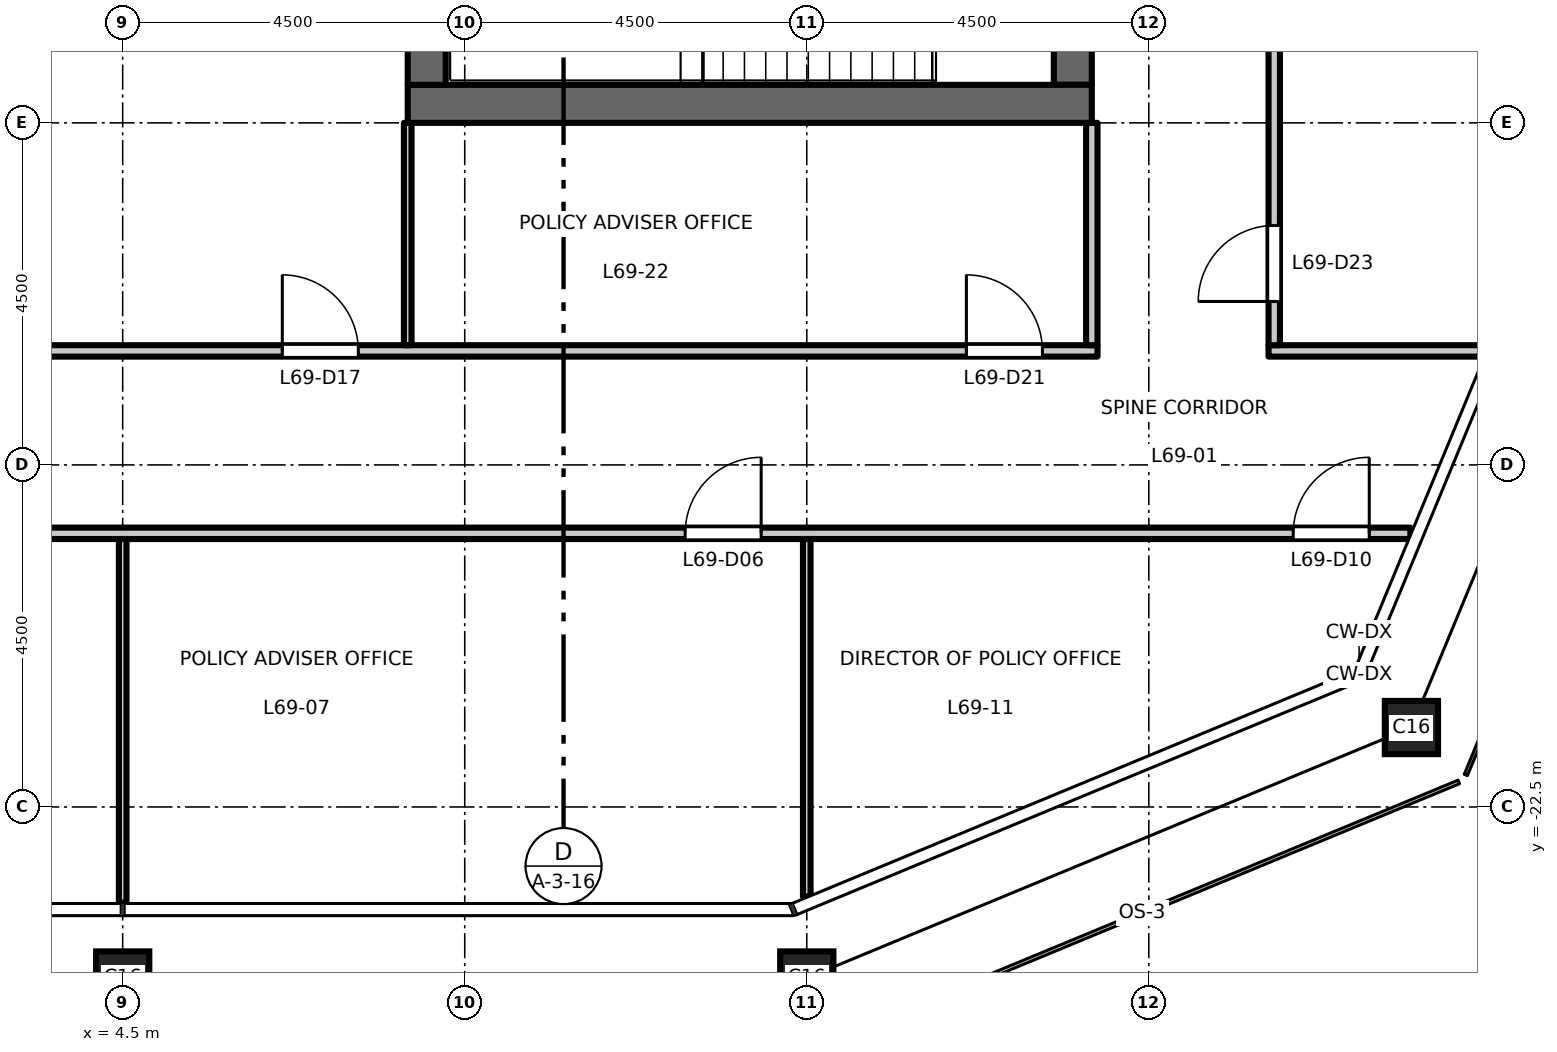
"""IFC4 building model, lengths in metres.
Left out: names, types, materials, properties, quantities, classifications, styles, units other than length and angle.
Written with IfcOpenShell. Run it as: python <this file> out.ifc"""

import sys

from ifc_helpers import new_model, si_unit, direction, frame, frame_2d, origin, origin_2d, place, context, subcontext, project, spatial, rectangle, hollow_rectangle, extrude, element, fill, save


model = new_model("IFC4")
c1 = context("Model", 3, precision=1e-05, world=origin(), true_north=direction((0.0, 1.0)))
c2 = subcontext(c1, "Body", "Model", "MODEL_VIEW")
j1 = project(units=[si_unit("LENGTHUNIT", "METRE"), si_unit("PLANEANGLEUNIT", "RADIAN")], contexts=[c1])
p1 = place(None, origin())
s1 = spatial("IfcSite", under=j1, at=p1, CompositionType="ELEMENT")
p2 = place(p1, origin())
s2 = spatial("IfcBuilding", under=s1, at=p2, CompositionType="ELEMENT")
p3 = place(p2, frame((0.0, 0.0, 321.2)))
s3 = spatial("IfcBuildingStorey", under=s2, at=p3, CompositionType="ELEMENT", Elevation=321.2)
for number, where, z_axis, x_axis in (
    (1, (4.5, -24.75, 0.0), (0.0, 0.0, 1.0), (1.0, 0.0, 0.0)),
    (2, (13.5, -24.75, 0.0), (0.0, 0.0, 1.0), (1.0, 0.0, 0.0)),
    (3, (21.455, -21.455, 0.0), (0.0, 0.0, 1.0), (1.0, 0.0, 0.0)),
):
    element("IfcColumn", number, at=place(p3, frame(where, z_axis=z_axis, x_axis=x_axis)), inside=s3, PredefinedType="COLUMN", context=c2, shape_type="SweptSolid", body=[
        extrude(hollow_rectangle(XDim=0.7, YDim=0.7, WallThickness=0.036, at=origin_2d()), origin(), (0.0, 0.0, 1.0), 4.5),
    ])
p4 = place(p3, frame((17.0, -13.0, 0.0), z_axis=(0.0, 0.0, 1.0), x_axis=(0.0, 1.0, 0.0)))
e4 = element("IfcWall", 4, at=p4, inside=s3, PredefinedType="SHEAR", context=c2, shape_type="SweptSolid", body=[
    extrude(rectangle(XDim=26.0, YDim=0.5, at=frame_2d((13.0, 0.0))), origin(), (0.0, 0.0, 1.0), 4.35),
])
p5 = place(p4, frame((16.825, 0.0, 0.0)))
e5 = element("IfcOpeningElement", 5, at=p5, cuts=e4, PredefinedType="OPENING", context=c2, shape_type="SweptSolid", body=[
    extrude(rectangle(XDim=1.8, YDim=2.1, at=frame_2d((0.9, 1.05))), frame((0.0, 0.26, 0.0), z_axis=(0.0, -1.0, 0.0), x_axis=(1.0, 0.0, 0.0)), (0.0, 0.0, 1.0), 0.52),
])
p6 = place(p4, frame((7.375, 0.0, 0.0)))
e6 = element("IfcOpeningElement", 6, at=p6, cuts=e4, PredefinedType="OPENING", context=c2, shape_type="SweptSolid", body=[
    extrude(rectangle(XDim=1.8, YDim=2.1, at=frame_2d((0.9, 1.05))), frame((0.0, 0.26, 0.0), z_axis=(0.0, -1.0, 0.0), x_axis=(1.0, 0.0, 0.0)), (0.0, 0.0, 1.0), 0.52),
])
p7 = place(p3, frame((8.25, -13.25, 0.0), z_axis=(0.0, 0.0, 1.0), x_axis=(1.0, 0.0, 0.0)))
e7 = element("IfcWall", 7, at=p7, inside=s3, PredefinedType="SHEAR", context=c2, shape_type="SweptSolid", body=[
    extrude(rectangle(XDim=9.0, YDim=0.5, at=frame_2d((4.5, 0.0))), origin(), (0.0, 0.0, 1.0), 4.35),
])
p8 = place(p3, frame((8.5, -13.0, 0.0), z_axis=(0.0, 0.0, 1.0), x_axis=(0.0, 1.0, 0.0)))
e8 = element("IfcWall", 8, at=p8, inside=s3, PredefinedType="SHEAR", context=c2, shape_type="SweptSolid", body=[
    extrude(rectangle(XDim=26.0, YDim=0.5, at=frame_2d((13.0, 0.0))), origin(), (0.0, 0.0, 1.0), 4.35),
])
p9 = place(p3, frame((-21.441, -18.9, 0.0), z_axis=(0.0, 0.0, 1.0), x_axis=(1.0, 0.0, 0.0)))
e9 = element("IfcWall", 9, at=p9, inside=s3, PredefinedType="PARTITIONING", context=c2, shape_type="SweptSolid", body=[
    extrude(rectangle(XDim=42.882, YDim=0.15, at=frame_2d((21.441, 0.0))), origin(), (0.0, 0.0, 1.0), 4.35),
])
p10 = place(p9, frame((15.341, 0.0, 0.0)))
e10 = element("IfcOpeningElement", 10, at=p10, cuts=e9, PredefinedType="OPENING", context=c2, shape_type="SweptSolid", body=[
    extrude(rectangle(XDim=1.0, YDim=2.1, at=frame_2d((0.5, 1.05))), frame((0.0, 0.085, 0.0), z_axis=(0.0, -1.0, 0.0), x_axis=(1.0, 0.0, 0.0)), (0.0, 0.0, 1.0), 0.17),
])
p11 = place(p9, frame((17.591, 0.0, 0.0)))
e11 = element("IfcOpeningElement", 11, at=p11, cuts=e9, PredefinedType="OPENING", context=c2, shape_type="SweptSolid", body=[
    extrude(rectangle(XDim=1.0, YDim=2.1, at=frame_2d((0.5, 1.05))), frame((0.0, 0.085, 0.0), z_axis=(0.0, -1.0, 0.0), x_axis=(1.0, 0.0, 0.0)), (0.0, 0.0, 1.0), 0.17),
])
p12 = place(p9, frame((33.341, 0.0, 0.0)))
e12 = element("IfcOpeningElement", 12, at=p12, cuts=e9, PredefinedType="OPENING", context=c2, shape_type="SweptSolid", body=[
    extrude(rectangle(XDim=1.0, YDim=2.1, at=frame_2d((0.5, 1.05))), frame((0.0, 0.085, 0.0), z_axis=(0.0, -1.0, 0.0), x_axis=(1.0, 0.0, 0.0)), (0.0, 0.0, 1.0), 0.17),
])
p13 = place(p9, frame((0.65, 0.0, 0.0)))
e13 = element("IfcOpeningElement", 13, at=p13, cuts=e9, PredefinedType="OPENING", context=c2, shape_type="SweptSolid", body=[
    extrude(rectangle(XDim=1.0, YDim=2.1, at=frame_2d((0.5, 1.05))), frame((0.0, 0.085, 0.0), z_axis=(0.0, -1.0, 0.0), x_axis=(1.0, 0.0, 0.0)), (0.0, 0.0, 1.0), 0.17),
])
p14 = place(p9, frame((41.341, 0.0, 0.0)))
e14 = element("IfcOpeningElement", 14, at=p14, cuts=e9, PredefinedType="OPENING", context=c2, shape_type="SweptSolid", body=[
    extrude(rectangle(XDim=1.0, YDim=2.1, at=frame_2d((0.5, 1.05))), frame((0.0, 0.085, 0.0), z_axis=(0.0, -1.0, 0.0), x_axis=(1.0, 0.0, 0.0)), (0.0, 0.0, 1.0), 0.17),
])
p15 = place(p3, frame((-17.325, -16.5, 0.0), z_axis=(0.0, 0.0, 1.0), x_axis=(1.0, 0.0, 0.0)))
e15 = element("IfcWall", 15, at=p15, inside=s3, PredefinedType="PARTITIONING", context=c2, shape_type="SweptSolid", body=[
    extrude(rectangle(XDim=34.65, YDim=0.15, at=frame_2d((17.325, 0.0))), origin(), (0.0, 0.0, 1.0), 4.35),
])
p16 = place(p15, frame((9.675, 0.0, 0.0)))
e16 = element("IfcOpeningElement", 16, at=p16, cuts=e15, PredefinedType="OPENING", context=c2, shape_type="SweptSolid", body=[
    extrude(rectangle(XDim=1.0, YDim=2.1, at=frame_2d((0.5, 1.05))), frame((0.0, 0.085, 0.0), z_axis=(0.0, -1.0, 0.0), x_axis=(1.0, 0.0, 0.0)), (0.0, 0.0, 1.0), 0.17),
])
p17 = place(p15, frame((23.925, 0.0, 0.0)))
e17 = element("IfcOpeningElement", 17, at=p17, cuts=e15, PredefinedType="OPENING", context=c2, shape_type="SweptSolid", body=[
    extrude(rectangle(XDim=1.0, YDim=2.1, at=frame_2d((0.5, 1.05))), frame((0.0, 0.085, 0.0), z_axis=(0.0, -1.0, 0.0), x_axis=(1.0, 0.0, 0.0)), (0.0, 0.0, 1.0), 0.17),
])
p18 = place(p15, frame((0.675, 0.0, 0.0)))
e18 = element("IfcOpeningElement", 18, at=p18, cuts=e15, PredefinedType="OPENING", context=c2, shape_type="SweptSolid", body=[
    extrude(rectangle(XDim=1.0, YDim=2.1, at=frame_2d((0.5, 1.05))), frame((0.0, 0.085, 0.0), z_axis=(0.0, -1.0, 0.0), x_axis=(1.0, 0.0, 0.0)), (0.0, 0.0, 1.0), 0.17),
])
p19 = place(p15, frame((32.925, 0.0, 0.0)))
e19 = element("IfcOpeningElement", 19, at=p19, cuts=e15, PredefinedType="OPENING", context=c2, shape_type="SweptSolid", body=[
    extrude(rectangle(XDim=1.0, YDim=2.1, at=frame_2d((0.5, 1.05))), frame((0.0, 0.085, 0.0), z_axis=(0.0, -1.0, 0.0), x_axis=(1.0, 0.0, 0.0)), (0.0, 0.0, 1.0), 0.17),
])
p20 = place(p3, frame((19.575, -16.5, 0.0), z_axis=(0.0, 0.0, 1.0), x_axis=(1.0, 0.0, 0.0)))
e20 = element("IfcWall", 20, at=p20, inside=s3, PredefinedType="PARTITIONING", context=c2, shape_type="SweptSolid", body=[
    extrude(rectangle(XDim=2.861, YDim=0.15, at=frame_2d((1.431, 0.0))), origin(), (0.0, 0.0, 1.0), 4.35),
])
p21 = place(p3, frame((4.5, -23.76, 0.0), z_axis=(0.0, 0.0, 1.0), x_axis=(0.0, 1.0, 0.0)))
e21 = element("IfcWall", 21, at=p21, inside=s3, PredefinedType="PARTITIONING", context=c2, shape_type="SweptSolid", body=[
    extrude(rectangle(XDim=4.785, YDim=0.1, at=frame_2d((2.393, 0.0))), origin(), (0.0, 0.0, 1.0), 3.65),
])
p22 = place(p3, frame((8.25, -16.425, 0.0), z_axis=(0.0, 0.0, 1.0), x_axis=(0.0, 1.0, 0.0)))
e22 = element("IfcWall", 22, at=p22, inside=s3, PredefinedType="PARTITIONING", context=c2, shape_type="SweptSolid", body=[
    extrude(rectangle(XDim=2.925, YDim=0.1, at=frame_2d((1.462, 0.0))), origin(), (0.0, 0.0, 1.0), 4.35),
])
p23 = place(p3, frame((13.5, -23.678, 0.0), z_axis=(0.0, 0.0, 1.0), x_axis=(0.0, 1.0, 0.0)))
e23 = element("IfcWall", 23, at=p23, inside=s3, PredefinedType="PARTITIONING", context=c2, shape_type="SweptSolid", body=[
    extrude(rectangle(XDim=4.703, YDim=0.1, at=frame_2d((2.352, 0.0))), origin(), (0.0, 0.0, 1.0), 3.75),
])
p24 = place(p3, frame((17.25, -16.425, 0.0), z_axis=(0.0, 0.0, 1.0), x_axis=(0.0, 1.0, 0.0)))
e24 = element("IfcWall", 24, at=p24, inside=s3, PredefinedType="PARTITIONING", context=c2, shape_type="SweptSolid", body=[
    extrude(rectangle(XDim=2.925, YDim=0.15, at=frame_2d((1.462, 0.0))), origin(), (0.0, 0.0, 1.0), 4.35),
])
p25 = place(p3, frame((19.65, -16.425, 0.0), z_axis=(0.0, 0.0, 1.0), x_axis=(0.0, 1.0, 0.0)))
e25 = element("IfcWall", 25, at=p25, inside=s3, PredefinedType="PARTITIONING", context=c2, shape_type="SweptSolid", body=[
    extrude(rectangle(XDim=32.85, YDim=0.15, at=frame_2d((16.425, 0.0))), origin(), (0.0, 0.0, 1.0), 4.35),
])
p26 = place(p25, frame((0.575, 0.0, 0.0)))
e26 = element("IfcOpeningElement", 26, at=p26, cuts=e25, PredefinedType="OPENING", context=c2, shape_type="SweptSolid", body=[
    extrude(rectangle(XDim=1.0, YDim=2.1, at=frame_2d((0.5, 1.05))), frame((0.0, 0.085, 0.0), z_axis=(0.0, -1.0, 0.0), x_axis=(1.0, 0.0, 0.0)), (0.0, 0.0, 1.0), 0.17),
])
p27 = place(p12, origin())
e27 = element("IfcDoor", 27, at=p27, inside=s3, OperationType="SINGLE_SWING_RIGHT", PredefinedType="DOOR", context=c2, shape_type="SweptSolid", body=[
    extrude(rectangle(XDim=1.0, YDim=2.1, at=frame_2d((0.5, 1.05))), frame((0.0, 0.025, 0.0), z_axis=(0.0, -1.0, 0.0), x_axis=(1.0, 0.0, 0.0)), (0.0, 0.0, 1.0), 0.05),
])
fill(e12, e27)
p28 = place(p14, origin())
e28 = element("IfcDoor", 28, at=p28, inside=s3, OperationType="SINGLE_SWING_RIGHT", PredefinedType="DOOR", context=c2, shape_type="SweptSolid", body=[
    extrude(rectangle(XDim=1.0, YDim=2.1, at=frame_2d((0.5, 1.05))), frame((0.0, 0.025, 0.0), z_axis=(0.0, -1.0, 0.0), x_axis=(1.0, 0.0, 0.0)), (0.0, 0.0, 1.0), 0.05),
])
fill(e14, e28)
p29 = place(p17, origin())
e29 = element("IfcDoor", 29, at=p29, inside=s3, OperationType="SINGLE_SWING_LEFT", PredefinedType="DOOR", context=c2, shape_type="SweptSolid", body=[
    extrude(rectangle(XDim=1.0, YDim=2.1, at=frame_2d((0.5, 1.05))), frame((0.0, 0.025, 0.0), z_axis=(0.0, -1.0, 0.0), x_axis=(1.0, 0.0, 0.0)), (0.0, 0.0, 1.0), 0.05),
])
fill(e17, e29)
p30 = place(p19, origin())
e30 = element("IfcDoor", 30, at=p30, inside=s3, OperationType="SINGLE_SWING_LEFT", PredefinedType="DOOR", context=c2, shape_type="SweptSolid", body=[
    extrude(rectangle(XDim=1.0, YDim=2.1, at=frame_2d((0.5, 1.05))), frame((0.0, 0.025, 0.0), z_axis=(0.0, -1.0, 0.0), x_axis=(1.0, 0.0, 0.0)), (0.0, 0.0, 1.0), 0.05),
])
fill(e19, e30)
p31 = place(p26, origin())
e31 = element("IfcDoor", 31, at=p31, inside=s3, OperationType="SINGLE_SWING_LEFT", PredefinedType="DOOR", context=c2, shape_type="SweptSolid", body=[
    extrude(rectangle(XDim=1.0, YDim=2.1, at=frame_2d((0.5, 1.05))), frame((0.0, 0.025, 0.0), z_axis=(0.0, -1.0, 0.0), x_axis=(1.0, 0.0, 0.0)), (0.0, 0.0, 1.0), 0.05),
])
fill(e26, e31)
save(model, sys.argv[1])
